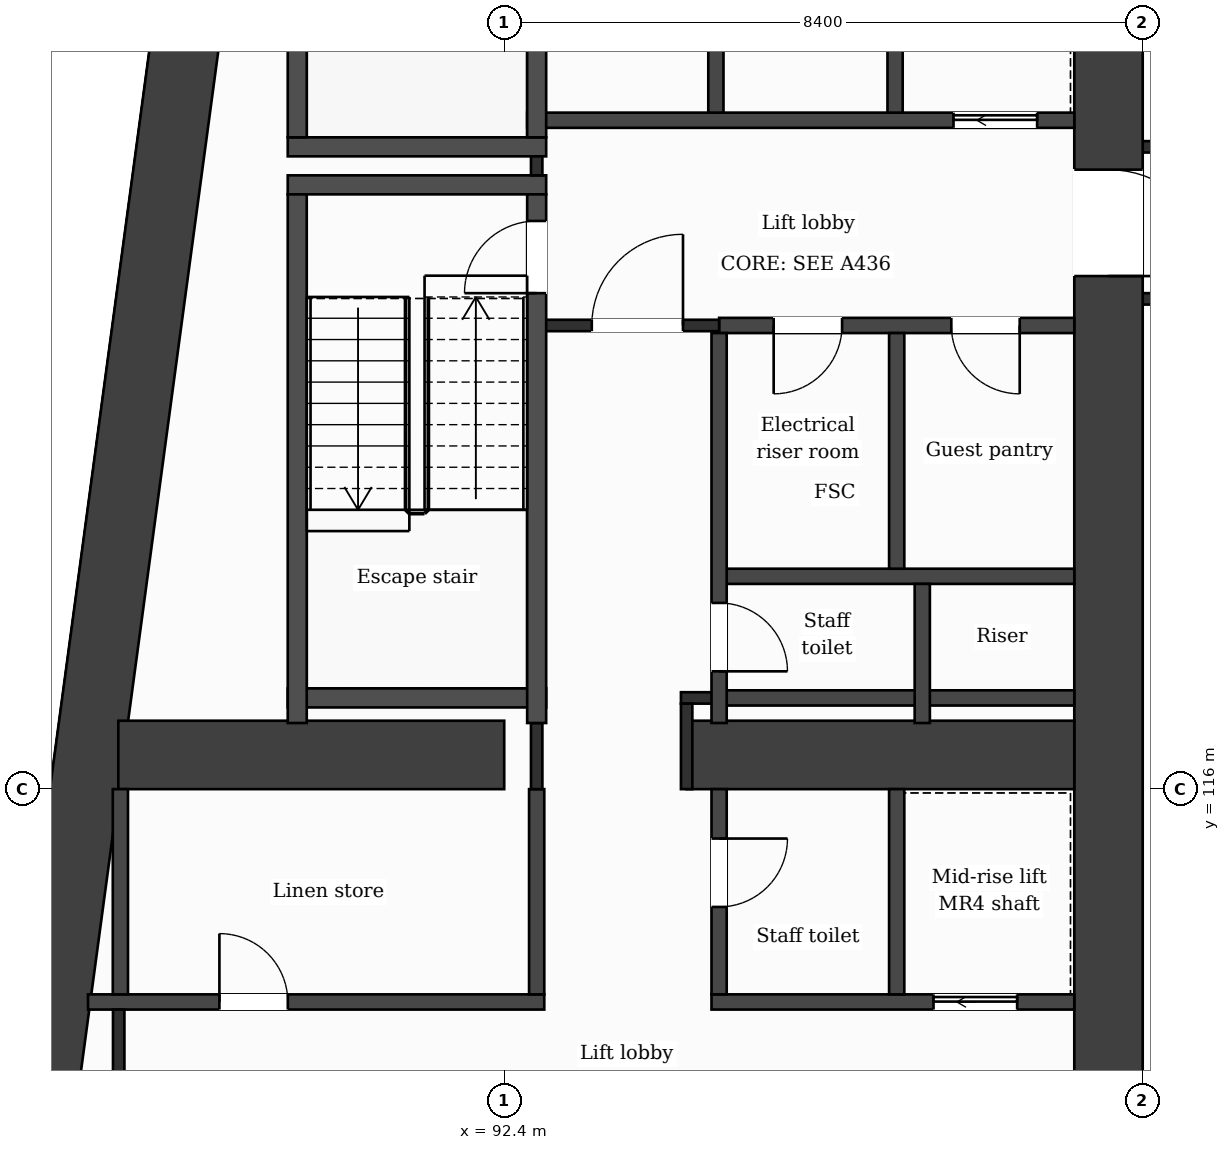
"""IFC4 building model, lengths in metres.
Left out: names, types, materials, properties, quantities, classifications, styles, units other than length and angle.
Written with IfcOpenShell. Run it as: python <this file> out.ifc"""

import sys

from ifc_helpers import new_model, si_unit, direction, frame, frame_2d, origin, place, context, subcontext, project, spatial, rectangle, extrude, element, fill, save


model = new_model("IFC4")
c1 = context("Model", 3, precision=1e-05, world=origin(), true_north=direction((0.0, 1.0)))
c2 = subcontext(c1, "Body", "Model", "MODEL_VIEW")
j1 = project(units=[si_unit("LENGTHUNIT", "METRE"), si_unit("PLANEANGLEUNIT", "RADIAN")], contexts=[c1])
p1 = place(None, origin())
s1 = spatial("IfcSite", under=j1, at=p1, CompositionType="ELEMENT")
p2 = place(p1, origin())
s2 = spatial("IfcBuilding", under=s1, at=p2, CompositionType="ELEMENT")
p3 = place(p2, frame((0.0, 0.0, 151.5)))
s3 = spatial("IfcBuildingStorey", under=s2, at=p3, CompositionType="ELEMENT", Elevation=151.5)
p4 = place(p3, frame((100.35, 131.95, 0.0), z_axis=(0.0, 0.0, 1.0), x_axis=(0.0, -1.0, 0.0)))
e1 = element("IfcWall", 1, at=p4, inside=s3, PredefinedType="SHEAR", context=c2, shape_type="SweptSolid", body=[
    extrude(rectangle(XDim=21.1, YDim=0.9, at=frame_2d((10.55, 0.0))), origin(), (0.0, 0.0, 1.0), 3.7),
])
p5 = place(p4, frame((7.8, 0.0, 0.0)))
e2 = element("IfcOpeningElement", 2, at=p5, cuts=e1, PredefinedType="OPENING", context=c2, shape_type="SweptSolid", body=[
    extrude(rectangle(XDim=1.4, YDim=2.1, at=frame_2d((0.7, 1.05))), frame((0.0, 0.46, 0.0), z_axis=(0.0, -1.0, 0.0), x_axis=(1.0, 0.0, 0.0)), (0.0, 0.0, 1.0), 0.92),
])
p6 = place(p3, frame((86.184, 110.85, 0.0), z_axis=(0.0, 0.0, 1.0), x_axis=(0.133410495943, 0.991060865725, 0.0)))
e3 = element("IfcWall", 3, at=p6, inside=s3, PredefinedType="SHEAR", context=c2, shape_type="SweptSolid", body=[
    extrude(rectangle(XDim=21.29, YDim=0.9, at=frame_2d((10.645, 0.0))), origin(), (0.0, 0.0, 1.0), 3.7),
])
p7 = place(p3, frame((87.323, 116.45, 0.0), z_axis=(0.0, 0.0, 1.0), x_axis=(1.0, 0.0, 0.0)))
e4 = element("IfcWall", 4, at=p7, inside=s3, PredefinedType="SHEAR", context=c2, shape_type="SweptSolid", body=[
    extrude(rectangle(XDim=5.077, YDim=0.9, at=frame_2d((2.539, 0.0))), origin(), (0.0, 0.0, 1.0), 3.7),
])
p8 = place(p3, frame((94.8, 116.45, 0.0), z_axis=(0.0, 0.0, 1.0), x_axis=(1.0, 0.0, 0.0)))
e5 = element("IfcWall", 5, at=p8, inside=s3, PredefinedType="SHEAR", context=c2, shape_type="SweptSolid", body=[
    extrude(rectangle(XDim=5.1, YDim=0.9, at=frame_2d((2.55, 0.0))), origin(), (0.0, 0.0, 1.0), 3.7),
])
p9 = place(p3, frame((86.924, 113.2, 0.0), z_axis=(0.0, 0.0, 1.0), x_axis=(1.0, 0.0, 0.0)))
e6 = element("IfcWall", 6, at=p9, inside=s3, PredefinedType="PARTITIONING", context=c2, shape_type="SweptSolid", body=[
    extrude(rectangle(XDim=6.003, YDim=0.2, at=frame_2d((3.001, 0.0))), origin(), (0.0, 0.0, 1.0), 3.38),
])
p10 = place(p9, frame((1.729, 0.0, 0.0)))
e7 = element("IfcOpeningElement", 7, at=p10, cuts=e6, PredefinedType="OPENING", context=c2, shape_type="SweptSolid", body=[
    extrude(rectangle(XDim=0.9, YDim=2.1, at=frame_2d((0.45, 1.05))), frame((0.0, 0.11, 0.0), z_axis=(0.0, -1.0, 0.0), x_axis=(1.0, 0.0, 0.0)), (0.0, 0.0, 1.0), 0.22),
])
p11 = place(p3, frame((95.127, 113.2, 0.0), z_axis=(0.0, 0.0, 1.0), x_axis=(1.0, 0.0, 0.0)))
e8 = element("IfcWall", 8, at=p11, inside=s3, PredefinedType="PARTITIONING", context=c2, shape_type="SweptSolid", body=[
    extrude(rectangle(XDim=4.773, YDim=0.2, at=frame_2d((2.386, 0.0))), origin(), (0.0, 0.0, 1.0), 3.38),
])
p12 = place(p11, frame((2.921, 0.0, 0.0)))
e9 = element("IfcOpeningElement", 9, at=p12, cuts=e8, PredefinedType="OPENING", context=c2, shape_type="SweptSolid", body=[
    extrude(rectangle(XDim=1.1, YDim=2.1, at=frame_2d((0.55, 1.05))), frame((0.0, 0.11, 0.0), z_axis=(0.0, -1.0, 0.0), x_axis=(1.0, 0.0, 0.0)), (0.0, 0.0, 1.0), 0.22),
])
p13 = place(p3, frame((95.227, 117.2, 0.0), z_axis=(0.0, 0.0, 1.0), x_axis=(1.0, 0.0, 0.0)))
e10 = element("IfcWall", 10, at=p13, inside=s3, PredefinedType="PARTITIONING", context=c2, shape_type="SweptSolid", body=[
    extrude(rectangle(XDim=4.673, YDim=0.2, at=frame_2d((2.336, 0.0))), origin(), (0.0, 0.0, 1.0), 3.38),
])
p14 = place(p3, frame((94.725, 117.2, 0.0), z_axis=(0.0, 0.0, 1.0), x_axis=(1.0, 0.0, 0.0)))
e11 = element("IfcWall", 11, at=p14, inside=s3, PredefinedType="PARTITIONING", context=c2, shape_type="SweptSolid", body=[
    extrude(rectangle(XDim=0.502, YDim=0.15, at=frame_2d((0.251, 0.0))), origin(), (0.0, 0.0, 1.0), 3.38),
])
p15 = place(p3, frame((89.552, 117.2, 0.0), z_axis=(0.0, 0.0, 1.0), x_axis=(1.0, 0.0, 0.0)))
e12 = element("IfcWall", 12, at=p15, inside=s3, PredefinedType="PARTITIONING", context=c2, shape_type="SweptSolid", body=[
    extrude(rectangle(XDim=3.4, YDim=0.25, at=frame_2d((1.7, 0.0))), origin(), (0.0, 0.0, 1.0), 3.38),
])
p16 = place(p3, frame((95.227, 118.8, 0.0), z_axis=(0.0, 0.0, 1.0), x_axis=(1.0, 0.0, 0.0)))
e13 = element("IfcWall", 13, at=p16, inside=s3, PredefinedType="PARTITIONING", context=c2, shape_type="SweptSolid", body=[
    extrude(rectangle(XDim=4.673, YDim=0.2, at=frame_2d((2.336, 0.0))), origin(), (0.0, 0.0, 1.0), 3.38),
])
p17 = place(p3, frame((95.227, 122.1, 0.0), z_axis=(0.0, 0.0, 1.0), x_axis=(1.0, 0.0, 0.0)))
e14 = element("IfcWall", 14, at=p17, inside=s3, PredefinedType="PARTITIONING", context=c2, shape_type="SweptSolid", body=[
    extrude(rectangle(XDim=4.673, YDim=0.2, at=frame_2d((2.336, 0.0))), origin(), (0.0, 0.0, 1.0), 3.38),
])
p18 = place(p17, frame((0.718, 0.0, 0.0)))
e15 = element("IfcOpeningElement", 15, at=p18, cuts=e14, PredefinedType="OPENING", context=c2, shape_type="SweptSolid", body=[
    extrude(rectangle(XDim=0.9, YDim=2.1, at=frame_2d((0.45, 1.05))), frame((0.0, 0.11, 0.0), z_axis=(0.0, -1.0, 0.0), x_axis=(1.0, 0.0, 0.0)), (0.0, 0.0, 1.0), 0.22),
])
p19 = place(p17, frame((3.055, 0.0, 0.0)))
e16 = element("IfcOpeningElement", 16, at=p19, cuts=e14, PredefinedType="OPENING", context=c2, shape_type="SweptSolid", body=[
    extrude(rectangle(XDim=0.9, YDim=2.1, at=frame_2d((0.45, 1.05))), frame((0.0, 0.11, 0.0), z_axis=(0.0, -1.0, 0.0), x_axis=(1.0, 0.0, 0.0)), (0.0, 0.0, 1.0), 0.22),
])
p20 = place(p3, frame((92.827, 122.1, 0.0), z_axis=(0.0, 0.0, 1.0), x_axis=(1.0, 0.0, 0.0)))
e17 = element("IfcWall", 17, at=p20, inside=s3, PredefinedType="PARTITIONING", context=c2, shape_type="SweptSolid", body=[
    extrude(rectangle(XDim=2.4, YDim=0.15, at=frame_2d((1.2, 0.0))), origin(), (0.0, 0.0, 1.0), 3.38),
])
p21 = place(p20, frame((0.725, 0.0, 0.0)))
e18 = element("IfcOpeningElement", 18, at=p21, cuts=e17, PredefinedType="OPENING", context=c2, shape_type="SweptSolid", body=[
    extrude(rectangle(XDim=1.2, YDim=2.1, at=frame_2d((0.6, 1.05))), frame((0.0, 0.085, 0.0), z_axis=(0.0, -1.0, 0.0), x_axis=(1.0, 0.0, 0.0)), (0.0, 0.0, 1.0), 0.17),
])
p22 = place(p3, frame((100.8, 122.45, 0.0), z_axis=(0.0, 0.0, 1.0), x_axis=(1.0, 0.0, 0.0)))
e19 = element("IfcWall", 19, at=p22, inside=s3, PredefinedType="PARTITIONING", context=c2, shape_type="SweptSolid", body=[
    extrude(rectangle(XDim=25.2, YDim=0.15, at=frame_2d((12.6, 0.0))), origin(), (0.0, 0.0, 1.0), 3.38),
])
for number, where, z_axis, x_axis in (
    (20, (89.552, 123.95, 0.0), (0.0, 0.0, 1.0), (1.0, 0.0, 0.0)),
    (21, (89.552, 124.45, 0.0), (0.0, 0.0, 1.0), (1.0, 0.0, 0.0)),
):
    element("IfcWall", number, at=place(p3, frame(where, z_axis=z_axis, x_axis=x_axis)), inside=s3, PredefinedType="PARTITIONING", context=c2, shape_type="SweptSolid", body=[
        extrude(rectangle(XDim=3.4, YDim=0.25, at=frame_2d((1.7, 0.0))), origin(), (0.0, 0.0, 1.0), 3.38),
    ])
p23 = place(p3, frame((100.8, 124.45, 0.0), z_axis=(0.0, 0.0, 1.0), x_axis=(1.0, 0.0, 0.0)))
e22 = element("IfcWall", 22, at=p23, inside=s3, PredefinedType="PARTITIONING", context=c2, shape_type="SweptSolid", body=[
    extrude(rectangle(XDim=25.2, YDim=0.15, at=frame_2d((12.6, 0.0))), origin(), (0.0, 0.0, 1.0), 3.38),
])
p24 = place(p23, frame((3.03, 0.0, 0.0)))
e23 = element("IfcOpeningElement", 23, at=p24, cuts=e22, PredefinedType="OPENING", context=c2, shape_type="SweptSolid", body=[
    extrude(rectangle(XDim=1.0, YDim=2.1, at=frame_2d((0.5, 1.05))), frame((0.0, 0.085, 0.0), z_axis=(0.0, -1.0, 0.0), x_axis=(1.0, 0.0, 0.0)), (0.0, 0.0, 1.0), 0.17),
])
p25 = place(p23, frame((12.77, 0.0, 0.0)))
e24 = element("IfcOpeningElement", 24, at=p25, cuts=e22, PredefinedType="OPENING", context=c2, shape_type="SweptSolid", body=[
    extrude(rectangle(XDim=1.0, YDim=2.1, at=frame_2d((0.5, 1.05))), frame((0.0, 0.085, 0.0), z_axis=(0.0, -1.0, 0.0), x_axis=(1.0, 0.0, 0.0)), (0.0, 0.0, 1.0), 0.17),
])
p26 = place(p23, frame((17.67, 0.0, 0.0)))
e25 = element("IfcOpeningElement", 25, at=p26, cuts=e22, PredefinedType="OPENING", context=c2, shape_type="SweptSolid", body=[
    extrude(rectangle(XDim=1.0, YDim=2.1, at=frame_2d((0.5, 1.05))), frame((0.0, 0.085, 0.0), z_axis=(0.0, -1.0, 0.0), x_axis=(1.0, 0.0, 0.0)), (0.0, 0.0, 1.0), 0.17),
])
p27 = place(p23, frame((22.35, 0.0, 0.0)))
e26 = element("IfcOpeningElement", 26, at=p27, cuts=e22, PredefinedType="OPENING", context=c2, shape_type="SweptSolid", body=[
    extrude(rectangle(XDim=1.0, YDim=2.1, at=frame_2d((0.5, 1.05))), frame((0.0, 0.085, 0.0), z_axis=(0.0, -1.0, 0.0), x_axis=(1.0, 0.0, 0.0)), (0.0, 0.0, 1.0), 0.17),
])
p28 = place(p3, frame((92.702, 124.8, 0.0), z_axis=(0.0, 0.0, 1.0), x_axis=(1.0, 0.0, 0.0)))
e27 = element("IfcWall", 27, at=p28, inside=s3, PredefinedType="PARTITIONING", context=c2, shape_type="SweptSolid", body=[
    extrude(rectangle(XDim=7.198, YDim=0.2, at=frame_2d((3.599, 0.0))), origin(), (0.0, 0.0, 1.0), 3.38),
])
p29 = place(p28, frame((5.609, 0.0, 0.0)))
e28 = element("IfcOpeningElement", 28, at=p29, cuts=e27, PredefinedType="OPENING", context=c2, shape_type="SweptSolid", body=[
    extrude(rectangle(XDim=1.1, YDim=2.1, at=frame_2d((0.55, 1.05))), frame((0.0, 0.11, 0.0), z_axis=(0.0, -1.0, 0.0), x_axis=(1.0, 0.0, 0.0)), (0.0, 0.0, 1.0), 0.22),
])
p30 = place(p3, frame((87.35, 113.3, 0.0), z_axis=(0.0, 0.0, 1.0), x_axis=(0.0, 1.0, 0.0)))
e29 = element("IfcWall", 29, at=p30, inside=s3, PredefinedType="PARTITIONING", context=c2, shape_type="SweptSolid", body=[
    extrude(rectangle(XDim=2.7, YDim=0.2, at=frame_2d((1.35, 0.0))), origin(), (0.0, 0.0, 1.0), 3.38),
])
p31 = place(p3, frame((87.328, 111.3, 0.0), z_axis=(0.0, 0.0, 1.0), x_axis=(0.0, 1.0, 0.0)))
e30 = element("IfcWall", 30, at=p31, inside=s3, PredefinedType="PARTITIONING", context=c2, shape_type="SweptSolid", body=[
    extrude(rectangle(XDim=1.8, YDim=0.15, at=frame_2d((0.9, 0.0))), origin(), (0.0, 0.0, 1.0), 3.38),
])
p32 = place(p3, frame((89.677, 116.87, 0.0), z_axis=(0.0, 0.0, 1.0), x_axis=(0.0, 1.0, 0.0)))
e31 = element("IfcWall", 31, at=p32, inside=s3, PredefinedType="PARTITIONING", context=c2, shape_type="SweptSolid", body=[
    extrude(rectangle(XDim=6.955, YDim=0.25, at=frame_2d((3.478, 0.0))), origin(), (0.0, 0.0, 1.0), 3.38),
])
p33 = place(p3, frame((89.677, 124.575, 0.0), z_axis=(0.0, 0.0, 1.0), x_axis=(0.0, 1.0, 0.0)))
e32 = element("IfcWall", 32, at=p33, inside=s3, PredefinedType="PARTITIONING", context=c2, shape_type="SweptSolid", body=[
    extrude(rectangle(XDim=6.955, YDim=0.25, at=frame_2d((3.478, 0.0))), origin(), (0.0, 0.0, 1.0), 3.38),
])
p34 = place(p3, frame((92.827, 113.3, 0.0), z_axis=(0.0, 0.0, 1.0), x_axis=(0.0, 1.0, 0.0)))
e33 = element("IfcWall", 33, at=p34, inside=s3, PredefinedType="PARTITIONING", context=c2, shape_type="SweptSolid", body=[
    extrude(rectangle(XDim=2.7, YDim=0.2, at=frame_2d((1.35, 0.0))), origin(), (0.0, 0.0, 1.0), 3.38),
])
p35 = place(p3, frame((92.827, 116.0, 0.0), z_axis=(0.0, 0.0, 1.0), x_axis=(0.0, 1.0, 0.0)))
e34 = element("IfcWall", 34, at=p35, inside=s3, PredefinedType="PARTITIONING", context=c2, shape_type="SweptSolid", body=[
    extrude(rectangle(XDim=0.87, YDim=0.15, at=frame_2d((0.435, 0.0))), origin(), (0.0, 0.0, 1.0), 3.38),
])
p36 = place(p3, frame((92.827, 124.075, 0.0), z_axis=(0.0, 0.0, 1.0), x_axis=(0.0, 1.0, 0.0)))
e35 = element("IfcWall", 35, at=p36, inside=s3, PredefinedType="PARTITIONING", context=c2, shape_type="SweptSolid", body=[
    extrude(rectangle(XDim=0.25, YDim=0.15, at=frame_2d((0.125, 0.0))), origin(), (0.0, 0.0, 1.0), 3.38),
])
p37 = place(p3, frame((92.827, 116.87, 0.0), z_axis=(0.0, 0.0, 1.0), x_axis=(0.0, 1.0, 0.0)))
e36 = element("IfcWall", 36, at=p37, inside=s3, PredefinedType="PARTITIONING", context=c2, shape_type="SweptSolid", body=[
    extrude(rectangle(XDim=6.955, YDim=0.25, at=frame_2d((3.478, 0.0))), origin(), (0.0, 0.0, 1.0), 3.38),
])
p38 = place(p37, frame((5.655, 0.0, 0.0)))
e37 = element("IfcOpeningElement", 37, at=p38, cuts=e36, PredefinedType="OPENING", context=c2, shape_type="SweptSolid", body=[
    extrude(rectangle(XDim=0.95, YDim=2.1, at=frame_2d((0.475, 1.05))), frame((0.0, 0.135, 0.0), z_axis=(0.0, -1.0, 0.0), x_axis=(1.0, 0.0, 0.0)), (0.0, 0.0, 1.0), 0.27),
])
p39 = place(p3, frame((92.827, 124.575, 0.0), z_axis=(0.0, 0.0, 1.0), x_axis=(0.0, 1.0, 0.0)))
e38 = element("IfcWall", 38, at=p39, inside=s3, PredefinedType="PARTITIONING", context=c2, shape_type="SweptSolid", body=[
    extrude(rectangle(XDim=6.955, YDim=0.25, at=frame_2d((3.478, 0.0))), origin(), (0.0, 0.0, 1.0), 3.38),
])
p40 = place(p39, frame((5.325, 0.0, 0.0)))
e39 = element("IfcOpeningElement", 39, at=p40, cuts=e38, PredefinedType="OPENING", context=c2, shape_type="SweptSolid", body=[
    extrude(rectangle(XDim=1.0, YDim=2.1, at=frame_2d((0.5, 1.05))), frame((0.0, 0.135, 0.0), z_axis=(0.0, -1.0, 0.0), x_axis=(1.0, 0.0, 0.0)), (0.0, 0.0, 1.0), 0.27),
])
p41 = place(p3, frame((94.8, 116.0, 0.0), z_axis=(0.0, 0.0, 1.0), x_axis=(0.0, 1.0, 0.0)))
e40 = element("IfcWall", 40, at=p41, inside=s3, PredefinedType="PARTITIONING", context=c2, shape_type="SweptSolid", body=[
    extrude(rectangle(XDim=1.125, YDim=0.15, at=frame_2d((0.562, 0.0))), origin(), (0.0, 0.0, 1.0), 3.38),
])
p42 = place(p3, frame((95.185, 124.9, 0.0), z_axis=(0.0, 0.0, 1.0), x_axis=(0.0, 1.0, 0.0)))
e41 = element("IfcWall", 41, at=p42, inside=s3, PredefinedType="PARTITIONING", context=c2, shape_type="SweptSolid", body=[
    extrude(rectangle(XDim=3.1, YDim=0.2, at=frame_2d((1.55, 0.0))), origin(), (0.0, 0.0, 1.0), 3.38),
])
p43 = place(p3, frame((95.227, 113.3, 0.0), z_axis=(0.0, 0.0, 1.0), x_axis=(0.0, 1.0, 0.0)))
e42 = element("IfcWall", 42, at=p43, inside=s3, PredefinedType="PARTITIONING", context=c2, shape_type="SweptSolid", body=[
    extrude(rectangle(XDim=2.7, YDim=0.2, at=frame_2d((1.35, 0.0))), origin(), (0.0, 0.0, 1.0), 3.38),
])
p44 = place(p43, frame((1.15, 0.0, 0.0)))
e43 = element("IfcOpeningElement", 43, at=p44, cuts=e42, PredefinedType="OPENING", context=c2, shape_type="SweptSolid", body=[
    extrude(rectangle(XDim=0.9, YDim=2.1, at=frame_2d((0.45, 1.05))), frame((0.0, 0.11, 0.0), z_axis=(0.0, -1.0, 0.0), x_axis=(1.0, 0.0, 0.0)), (0.0, 0.0, 1.0), 0.22),
])
p45 = place(p3, frame((95.227, 116.87, 0.0), z_axis=(0.0, 0.0, 1.0), x_axis=(0.0, 1.0, 0.0)))
e44 = element("IfcWall", 44, at=p45, inside=s3, PredefinedType="PARTITIONING", context=c2, shape_type="SweptSolid", body=[
    extrude(rectangle(XDim=5.13, YDim=0.2, at=frame_2d((2.565, 0.0))), origin(), (0.0, 0.0, 1.0), 3.38),
])
p46 = place(p45, frame((0.68, 0.0, 0.0)))
e45 = element("IfcOpeningElement", 45, at=p46, cuts=e44, PredefinedType="OPENING", context=c2, shape_type="SweptSolid", body=[
    extrude(rectangle(XDim=0.9, YDim=2.1, at=frame_2d((0.45, 1.05))), frame((0.0, 0.11, 0.0), z_axis=(0.0, -1.0, 0.0), x_axis=(1.0, 0.0, 0.0)), (0.0, 0.0, 1.0), 0.22),
])
p47 = place(p3, frame((97.542, 124.9, 0.0), z_axis=(0.0, 0.0, 1.0), x_axis=(0.0, 1.0, 0.0)))
e46 = element("IfcWall", 46, at=p47, inside=s3, PredefinedType="PARTITIONING", context=c2, shape_type="SweptSolid", body=[
    extrude(rectangle(XDim=3.1, YDim=0.2, at=frame_2d((1.55, 0.0))), origin(), (0.0, 0.0, 1.0), 3.38),
])
p48 = place(p3, frame((97.563, 113.3, 0.0), z_axis=(0.0, 0.0, 1.0), x_axis=(0.0, 1.0, 0.0)))
e47 = element("IfcWall", 47, at=p48, inside=s3, PredefinedType="PARTITIONING", context=c2, shape_type="SweptSolid", body=[
    extrude(rectangle(XDim=2.7, YDim=0.2, at=frame_2d((1.35, 0.0))), origin(), (0.0, 0.0, 1.0), 3.38),
])
p49 = place(p3, frame((97.563, 118.9, 0.0), z_axis=(0.0, 0.0, 1.0), x_axis=(0.0, 1.0, 0.0)))
e48 = element("IfcWall", 48, at=p49, inside=s3, PredefinedType="PARTITIONING", context=c2, shape_type="SweptSolid", body=[
    extrude(rectangle(XDim=3.1, YDim=0.2, at=frame_2d((1.55, 0.0))), origin(), (0.0, 0.0, 1.0), 3.38),
])
p50 = place(p3, frame((97.9, 116.87, 0.0), z_axis=(0.0, 0.0, 1.0), x_axis=(0.0, 1.0, 0.0)))
e49 = element("IfcWall", 49, at=p50, inside=s3, PredefinedType="PARTITIONING", context=c2, shape_type="SweptSolid", body=[
    extrude(rectangle(XDim=1.83, YDim=0.2, at=frame_2d((0.915, 0.0))), origin(), (0.0, 0.0, 1.0), 3.38),
])
p51 = place(p21, origin())
e50 = element("IfcDoor", 50, at=p51, inside=s3, OperationType="SINGLE_SWING_RIGHT", PredefinedType="DOOR", context=c2, shape_type="SweptSolid", body=[
    extrude(rectangle(XDim=1.2, YDim=2.1, at=frame_2d((0.6, 1.05))), frame((0.0, 0.025, 0.0), z_axis=(0.0, -1.0, 0.0), x_axis=(1.0, 0.0, 0.0)), (0.0, 0.0, 1.0), 0.05),
])
fill(e18, e50)
p52 = place(p29, origin())
e51 = element("IfcDoor", 51, at=p52, inside=s3, OperationType="SLIDING_TO_LEFT", PredefinedType="DOOR", context=c2, shape_type="SweptSolid", body=[
    extrude(rectangle(XDim=1.1, YDim=2.1, at=frame_2d((0.55, 1.05))), frame((0.0, 0.025, 0.0), z_axis=(0.0, -1.0, 0.0), x_axis=(1.0, 0.0, 0.0)), (0.0, 0.0, 1.0), 0.05),
])
fill(e28, e51)
p53 = place(p18, origin())
e52 = element("IfcDoor", 52, at=p53, inside=s3, OperationType="SINGLE_SWING_LEFT", PredefinedType="DOOR", context=c2, shape_type="SweptSolid", body=[
    extrude(rectangle(XDim=0.9, YDim=2.1, at=frame_2d((0.45, 1.05))), frame((0.0, 0.025, 0.0), z_axis=(0.0, -1.0, 0.0), x_axis=(1.0, 0.0, 0.0)), (0.0, 0.0, 1.0), 0.05),
])
fill(e15, e52)
p54 = place(p19, origin())
e53 = element("IfcDoor", 53, at=p54, inside=s3, OperationType="SINGLE_SWING_RIGHT", PredefinedType="DOOR", context=c2, shape_type="SweptSolid", body=[
    extrude(rectangle(XDim=0.9, YDim=2.1, at=frame_2d((0.45, 1.05))), frame((0.0, 0.025, 0.0), z_axis=(0.0, -1.0, 0.0), x_axis=(1.0, 0.0, 0.0)), (0.0, 0.0, 1.0), 0.05),
])
fill(e16, e53)
p55 = place(p38, origin())
e54 = element("IfcDoor", 54, at=p55, inside=s3, OperationType="SINGLE_SWING_LEFT", PredefinedType="DOOR", context=c2, shape_type="SweptSolid", body=[
    extrude(rectangle(XDim=0.95, YDim=2.1, at=frame_2d((0.475, 1.05))), frame((0.0, 0.025, 0.0), z_axis=(0.0, -1.0, 0.0), x_axis=(1.0, 0.0, 0.0)), (0.0, 0.0, 1.0), 0.05),
])
fill(e37, e54)
p56 = place(p46, origin())
e55 = element("IfcDoor", 55, at=p56, inside=s3, OperationType="SINGLE_SWING_LEFT", PredefinedType="DOOR", context=c2, shape_type="SweptSolid", body=[
    extrude(rectangle(XDim=0.9, YDim=2.1, at=frame_2d((0.45, 1.05))), frame((0.0, 0.025, 0.0), z_axis=(0.0, -1.0, 0.0), x_axis=(1.0, 0.0, 0.0)), (0.0, 0.0, 1.0), 0.05),
])
fill(e45, e55)
p57 = place(p12, origin())
e56 = element("IfcDoor", 56, at=p57, inside=s3, OperationType="SLIDING_TO_LEFT", PredefinedType="DOOR", context=c2, shape_type="SweptSolid", body=[
    extrude(rectangle(XDim=1.1, YDim=2.1, at=frame_2d((0.55, 1.05))), frame((0.0, 0.025, 0.0), z_axis=(0.0, -1.0, 0.0), x_axis=(1.0, 0.0, 0.0)), (0.0, 0.0, 1.0), 0.05),
])
fill(e9, e56)
p58 = place(p10, origin())
e57 = element("IfcDoor", 57, at=p58, inside=s3, OperationType="SINGLE_SWING_LEFT", PredefinedType="DOOR", context=c2, shape_type="SweptSolid", body=[
    extrude(rectangle(XDim=0.9, YDim=2.1, at=frame_2d((0.45, 1.05))), frame((0.0, 0.025, 0.0), z_axis=(0.0, -1.0, 0.0), x_axis=(1.0, 0.0, 0.0)), (0.0, 0.0, 1.0), 0.05),
])
fill(e7, e57)
p59 = place(p44, origin())
e58 = element("IfcDoor", 58, at=p59, inside=s3, OperationType="SINGLE_SWING_RIGHT", PredefinedType="DOOR", context=c2, shape_type="SweptSolid", body=[
    extrude(rectangle(XDim=0.9, YDim=2.1, at=frame_2d((0.45, 1.05))), frame((0.0, 0.025, 0.0), z_axis=(0.0, -1.0, 0.0), x_axis=(1.0, 0.0, 0.0)), (0.0, 0.0, 1.0), 0.05),
])
fill(e43, e58)
p60 = place(p5, origin())
e59 = element("IfcDoor", 59, at=p60, inside=s3, OperationType="SINGLE_SWING_RIGHT", PredefinedType="DOOR", context=c2, shape_type="SweptSolid", body=[
    extrude(rectangle(XDim=1.4, YDim=2.1, at=frame_2d((0.7, 1.05))), frame((0.0, 0.025, 0.0), z_axis=(0.0, -1.0, 0.0), x_axis=(1.0, 0.0, 0.0)), (0.0, 0.0, 1.0), 0.05),
])
fill(e2, e59)
save(model, sys.argv[1])
